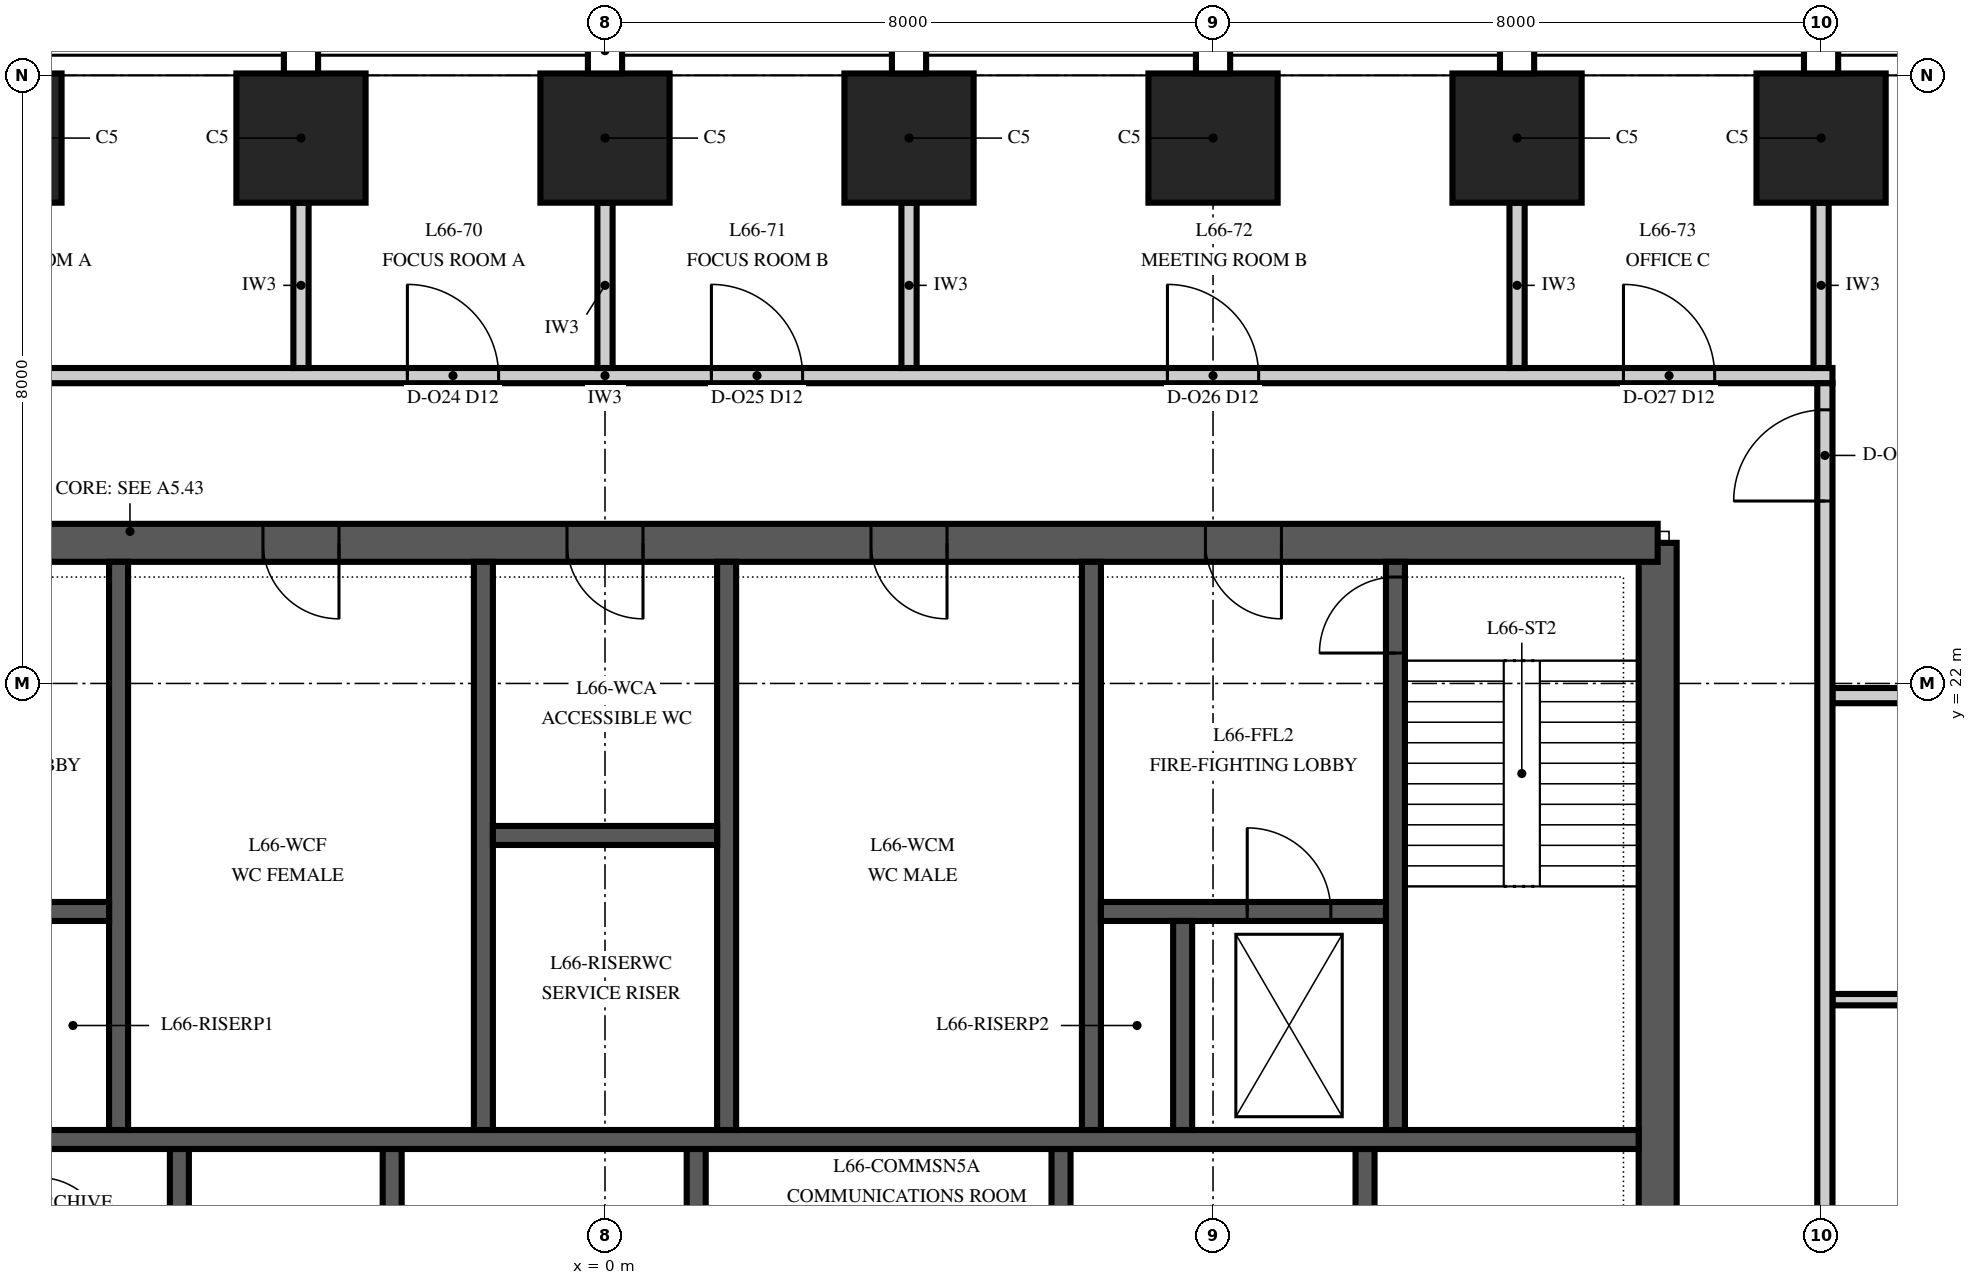
"""IFC4 building model, lengths in metres.
Left out: names, types, materials, properties, quantities, classifications, styles, units other than length and angle.
Written with IfcOpenShell. Run it as: python <this file> out.ifc"""

import sys

from ifc_helpers import new_model, si_unit, direction, frame, frame_2d, origin, origin_2d, place, context, subcontext, project, spatial, polyline, rectangle, outline, extrude, element, fill, save


model = new_model("IFC4")
c1 = context("Model", 3, precision=1e-05, world=origin(), true_north=direction((0.0, 1.0)))
c2 = subcontext(c1, "Body", "Model", "MODEL_VIEW")
j1 = project(units=[si_unit("LENGTHUNIT", "METRE"), si_unit("PLANEANGLEUNIT", "RADIAN")], contexts=[c1])
p1 = place(None, origin())
s1 = spatial("IfcSite", under=j1, at=p1, CompositionType="ELEMENT")
p2 = place(p1, origin())
s2 = spatial("IfcBuilding", under=s1, at=p2, CompositionType="ELEMENT")
p3 = place(p2, frame((0.0, 0.0, 284.0)))
s3 = spatial("IfcBuildingStorey", under=s2, at=p3, CompositionType="ELEMENT", Elevation=284.0)
for number, where, z_axis, x_axis in (
    (1, (16.0, 29.175, 0.0), (0.0, 0.0, 1.0), (-1.0, 0.0, 0.0)),
    (2, (12.0, 29.175, 0.0), (0.0, 0.0, 1.0), (-1.0, 0.0, 0.0)),
    (3, (8.0, 29.175, 0.0), (0.0, 0.0, 1.0), (-1.0, 0.0, 0.0)),
    (4, (4.0, 29.175, 0.0), (0.0, 0.0, 1.0), (-1.0, 0.0, 0.0)),
    (5, (0.0, 29.175, 0.0), (0.0, 0.0, 1.0), (-1.0, 0.0, 0.0)),
    (6, (-4.0, 29.175, 0.0), (0.0, 0.0, 1.0), (-1.0, 0.0, 0.0)),
    (7, (-8.0, 29.175, 0.0), (0.0, 0.0, 1.0), (-1.0, 0.0, 0.0)),
):
    element("IfcColumn", number, at=place(p3, frame(where, z_axis=z_axis, x_axis=x_axis)), inside=s3, PredefinedType="COLUMN", context=c2, shape_type="SweptSolid", body=[
        extrude(rectangle(XDim=1.7, YDim=1.7, at=origin_2d()), origin(), (0.0, 0.0, 1.0), 4.0),
    ])
p4 = place(p3, frame((13.85, 6.15, 0.0), z_axis=(0.0, 0.0, 1.0), x_axis=(0.0, 1.0, 0.0)))
e8 = element("IfcWall", 8, at=p4, inside=s3, PredefinedType="SHEAR", context=c2, shape_type="SweptSolid", body=[
    extrude(outline(polyline([(0.0, -0.25), (17.7, -0.25), (17.7, 0.0), (17.45, 0.0), (17.45, 0.25), (0.25, 0.25), (0.25, 0.0), (0.0, 0.0), (0.0, -0.25)])), origin(), (0.0, 0.0, 1.0), 4.0),
])
p5 = place(p4, frame((4.15, 0.0, 0.0)))
e9 = element("IfcOpeningElement", 9, at=p5, cuts=e8, PredefinedType="OPENING", context=c2, shape_type="SweptSolid", body=[
    extrude(rectangle(XDim=1.8, YDim=2.4, at=frame_2d((0.9, 1.2))), frame((0.0, 0.265, 0.0), z_axis=(0.0, -1.0, 0.0), x_axis=(1.0, 0.0, 0.0)), (0.0, 0.0, 1.0), 0.53),
])
p6 = place(p3, frame((13.85, 23.85, 0.0), z_axis=(0.0, 0.0, 1.0), x_axis=(-1.0, 0.0, 0.0)))
e10 = element("IfcWall", 10, at=p6, inside=s3, PredefinedType="SHEAR", context=c2, shape_type="SweptSolid", body=[
    extrude(rectangle(XDim=27.7, YDim=0.5, at=frame_2d((13.85, 0.0))), origin(), (0.0, 0.0, 1.0), 4.0),
])
p7 = place(p6, frame((21.75, 0.0, 0.0)))
e11 = element("IfcOpeningElement", 11, at=p7, cuts=e10, PredefinedType="OPENING", context=c2, shape_type="SweptSolid", body=[
    extrude(rectangle(XDim=1.0, YDim=2.1, at=frame_2d((0.5, 1.05))), frame((0.0, 0.265, 0.0), z_axis=(0.0, -1.0, 0.0), x_axis=(1.0, 0.0, 0.0)), (0.0, 0.0, 1.0), 0.53),
])
p8 = place(p6, frame((4.95, 0.0, 0.0)))
e12 = element("IfcOpeningElement", 12, at=p8, cuts=e10, PredefinedType="OPENING", context=c2, shape_type="SweptSolid", body=[
    extrude(rectangle(XDim=1.0, YDim=2.1, at=frame_2d((0.5, 1.05))), frame((0.0, 0.265, 0.0), z_axis=(0.0, -1.0, 0.0), x_axis=(1.0, 0.0, 0.0)), (0.0, 0.0, 1.0), 0.53),
])
p9 = place(p6, frame((17.35, 0.0, 0.0)))
e13 = element("IfcOpeningElement", 13, at=p9, cuts=e10, PredefinedType="OPENING", context=c2, shape_type="SweptSolid", body=[
    extrude(rectangle(XDim=1.0, YDim=2.1, at=frame_2d((0.5, 1.05))), frame((0.0, 0.265, 0.0), z_axis=(0.0, -1.0, 0.0), x_axis=(1.0, 0.0, 0.0)), (0.0, 0.0, 1.0), 0.53),
])
p10 = place(p6, frame((13.35, 0.0, 0.0)))
e14 = element("IfcOpeningElement", 14, at=p10, cuts=e10, PredefinedType="OPENING", context=c2, shape_type="SweptSolid", body=[
    extrude(rectangle(XDim=1.0, YDim=2.1, at=frame_2d((0.5, 1.05))), frame((0.0, 0.265, 0.0), z_axis=(0.0, -1.0, 0.0), x_axis=(1.0, 0.0, 0.0)), (0.0, 0.0, 1.0), 0.53),
])
p11 = place(p6, frame((9.35, 0.0, 0.0)))
e15 = element("IfcOpeningElement", 15, at=p11, cuts=e10, PredefinedType="OPENING", context=c2, shape_type="SweptSolid", body=[
    extrude(rectangle(XDim=1.0, YDim=2.1, at=frame_2d((0.5, 1.05))), frame((0.0, 0.265, 0.0), z_axis=(0.0, -1.0, 0.0), x_axis=(1.0, 0.0, 0.0)), (0.0, 0.0, 1.0), 0.53),
])
p12 = place(p3, frame((-13.6, 16.0, 0.0), z_axis=(0.0, 0.0, 1.0), x_axis=(1.0, 0.0, 0.0)))
e16 = element("IfcWall", 16, at=p12, inside=s3, PredefinedType="SHEAR", context=c2, shape_type="SweptSolid", body=[
    extrude(rectangle(XDim=27.2, YDim=0.25, at=frame_2d((13.6, 0.0))), origin(), (0.0, 0.0, 1.0), 4.0),
])
for number, where, z_axis, x_axis in (
    (17, (-5.6, 13.125, 0.0), (0.0, 0.0, 1.0), (0.0, 1.0, 0.0)),
    (18, (-2.8, 13.125, 0.0), (0.0, 0.0, 1.0), (0.0, 1.0, 0.0)),
    (19, (1.2, 13.125, 0.0), (0.0, 0.0, 1.0), (0.0, 1.0, 0.0)),
    (20, (6.0, 13.125, 0.0), (0.0, 0.0, 1.0), (0.0, 1.0, 0.0)),
    (21, (10.0, 13.125, 0.0), (0.0, 0.0, 1.0), (0.0, 1.0, 0.0)),
):
    element("IfcWall", number, at=place(p3, frame(where, z_axis=z_axis, x_axis=x_axis)), inside=s3, PredefinedType="SHEAR", context=c2, shape_type="SweptSolid", body=[
        extrude(rectangle(XDim=2.75, YDim=0.25, at=frame_2d((1.375, 0.0))), origin(), (0.0, 0.0, 1.0), 4.0),
    ])
for number, where, z_axis, x_axis in (
    (22, (-6.4, 16.125, 0.0), (0.0, 0.0, 1.0), (0.0, 1.0, 0.0)),
    (23, (-1.6, 16.125, 0.0), (0.0, 0.0, 1.0), (0.0, 1.0, 0.0)),
    (24, (1.6, 16.125, 0.0), (0.0, 0.0, 1.0), (0.0, 1.0, 0.0)),
    (25, (6.4, 16.125, 0.0), (0.0, 0.0, 1.0), (0.0, 1.0, 0.0)),
):
    element("IfcWall", number, at=place(p3, frame(where, z_axis=z_axis, x_axis=x_axis)), inside=s3, PredefinedType="SHEAR", context=c2, shape_type="SweptSolid", body=[
        extrude(rectangle(XDim=7.475, YDim=0.25, at=frame_2d((3.738, 0.0))), origin(), (0.0, 0.0, 1.0), 4.0),
    ])
p13 = place(p3, frame((10.4, 16.125, 0.0), z_axis=(0.0, 0.0, 1.0), x_axis=(0.0, 1.0, 0.0)))
e26 = element("IfcWall", 26, at=p13, inside=s3, PredefinedType="SHEAR", context=c2, shape_type="SweptSolid", body=[
    extrude(rectangle(XDim=7.475, YDim=0.25, at=frame_2d((3.738, 0.0))), origin(), (0.0, 0.0, 1.0), 4.0),
])
p14 = place(p13, frame((6.275, 0.0, 0.0)))
e27 = element("IfcOpeningElement", 27, at=p14, cuts=e26, PredefinedType="OPENING", context=c2, shape_type="SweptSolid", body=[
    extrude(rectangle(XDim=1.0, YDim=2.1, at=frame_2d((0.5, 1.05))), frame((0.0, 0.14, 0.0), z_axis=(0.0, -1.0, 0.0), x_axis=(1.0, 0.0, 0.0)), (0.0, 0.0, 1.0), 0.28),
])
p15 = place(p3, frame((-10.275, 19.0, 0.0), z_axis=(0.0, 0.0, 1.0), x_axis=(1.0, 0.0, 0.0)))
e28 = element("IfcWall", 28, at=p15, inside=s3, PredefinedType="SHEAR", context=c2, shape_type="SweptSolid", body=[
    extrude(rectangle(XDim=3.75, YDim=0.25, at=frame_2d((1.875, 0.0))), origin(), (0.0, 0.0, 1.0), 4.0),
])
p16 = place(p15, frame((0.725, 0.0, 0.0)))
e29 = element("IfcOpeningElement", 29, at=p16, cuts=e28, PredefinedType="OPENING", context=c2, shape_type="SweptSolid", body=[
    extrude(rectangle(XDim=1.1, YDim=2.1, at=frame_2d((0.55, 1.05))), frame((0.0, 0.14, 0.0), z_axis=(0.0, -1.0, 0.0), x_axis=(1.0, 0.0, 0.0)), (0.0, 0.0, 1.0), 0.28),
])
p17 = place(p3, frame((6.525, 19.0, 0.0), z_axis=(0.0, 0.0, 1.0), x_axis=(1.0, 0.0, 0.0)))
e30 = element("IfcWall", 30, at=p17, inside=s3, PredefinedType="SHEAR", context=c2, shape_type="SweptSolid", body=[
    extrude(rectangle(XDim=3.75, YDim=0.25, at=frame_2d((1.875, 0.0))), origin(), (0.0, 0.0, 1.0), 4.0),
])
p18 = place(p17, frame((1.925, 0.0, 0.0)))
e31 = element("IfcOpeningElement", 31, at=p18, cuts=e30, PredefinedType="OPENING", context=c2, shape_type="SweptSolid", body=[
    extrude(rectangle(XDim=1.1, YDim=2.1, at=frame_2d((0.55, 1.05))), frame((0.0, 0.14, 0.0), z_axis=(0.0, -1.0, 0.0), x_axis=(1.0, 0.0, 0.0)), (0.0, 0.0, 1.0), 0.28),
])
p19 = place(p3, frame((7.6, 16.125, 0.0), z_axis=(0.0, 0.0, 1.0), x_axis=(0.0, 1.0, 0.0)))
e32 = element("IfcWall", 32, at=p19, inside=s3, PredefinedType="SHEAR", context=c2, shape_type="SweptSolid", body=[
    extrude(rectangle(XDim=2.75, YDim=0.25, at=frame_2d((1.375, 0.0))), origin(), (0.0, 0.0, 1.0), 4.0),
])
p20 = place(p3, frame((-1.475, 20.0, 0.0), z_axis=(0.0, 0.0, 1.0), x_axis=(1.0, 0.0, 0.0)))
e33 = element("IfcWall", 33, at=p20, inside=s3, PredefinedType="SHEAR", context=c2, shape_type="SweptSolid", body=[
    extrude(rectangle(XDim=2.95, YDim=0.25, at=frame_2d((1.475, 0.0))), origin(), (0.0, 0.0, 1.0), 4.0),
])
p21 = place(p3, frame((16.15, 17.84, 0.0), z_axis=(0.0, 0.0, 1.0), x_axis=(1.0, 0.0, 0.0)))
e34 = element("IfcWall", 34, at=p21, inside=s3, PredefinedType="PARTITIONING", context=c2, shape_type="SweptSolid", body=[
    extrude(rectangle(XDim=3.575, YDim=0.15, at=frame_2d((1.788, 0.0))), origin(), (0.0, 0.0, 1.0), 3.23),
])
p22 = place(p3, frame((16.15, 21.84, 0.0), z_axis=(0.0, 0.0, 1.0), x_axis=(1.0, 0.0, 0.0)))
e35 = element("IfcWall", 35, at=p22, inside=s3, PredefinedType="PARTITIONING", context=c2, shape_type="SweptSolid", body=[
    extrude(rectangle(XDim=7.174, YDim=0.2, at=frame_2d((3.587, 0.0))), origin(), (0.0, 0.0, 1.0), 3.23),
])
p23 = place(p3, frame((-16.15, 26.05, 0.0), z_axis=(0.0, 0.0, 1.0), x_axis=(1.0, 0.0, 0.0)))
e36 = element("IfcWall", 36, at=p23, inside=s3, PredefinedType="PARTITIONING", context=c2, shape_type="SweptSolid", body=[
    extrude(rectangle(XDim=32.3, YDim=0.2, at=frame_2d((16.15, 0.0))), origin(), (0.0, 0.0, 1.0), 3.418),
])
p24 = place(p23, frame((1.55, 0.0, 0.0)))
e37 = element("IfcOpeningElement", 37, at=p24, cuts=e36, PredefinedType="OPENING", context=c2, shape_type="SweptSolid", body=[
    extrude(rectangle(XDim=1.2, YDim=2.4, at=frame_2d((0.6, 1.2))), frame((0.0, 0.115, 0.0), z_axis=(0.0, -1.0, 0.0), x_axis=(1.0, 0.0, 0.0)), (0.0, 0.0, 1.0), 0.23),
])
p25 = place(p23, frame((7.55, 0.0, 0.0)))
e38 = element("IfcOpeningElement", 38, at=p25, cuts=e36, PredefinedType="OPENING", context=c2, shape_type="SweptSolid", body=[
    extrude(rectangle(XDim=1.2, YDim=2.4, at=frame_2d((0.6, 1.2))), frame((0.0, 0.115, 0.0), z_axis=(0.0, -1.0, 0.0), x_axis=(1.0, 0.0, 0.0)), (0.0, 0.0, 1.0), 0.23),
])
p26 = place(p23, frame((13.55, 0.0, 0.0)))
e39 = element("IfcOpeningElement", 39, at=p26, cuts=e36, PredefinedType="OPENING", context=c2, shape_type="SweptSolid", body=[
    extrude(rectangle(XDim=1.2, YDim=2.4, at=frame_2d((0.6, 1.2))), frame((0.0, 0.115, 0.0), z_axis=(0.0, -1.0, 0.0), x_axis=(1.0, 0.0, 0.0)), (0.0, 0.0, 1.0), 0.23),
])
p27 = place(p23, frame((17.55, 0.0, 0.0)))
e40 = element("IfcOpeningElement", 40, at=p27, cuts=e36, PredefinedType="OPENING", context=c2, shape_type="SweptSolid", body=[
    extrude(rectangle(XDim=1.2, YDim=2.4, at=frame_2d((0.6, 1.2))), frame((0.0, 0.115, 0.0), z_axis=(0.0, -1.0, 0.0), x_axis=(1.0, 0.0, 0.0)), (0.0, 0.0, 1.0), 0.23),
])
p28 = place(p23, frame((23.55, 0.0, 0.0)))
e41 = element("IfcOpeningElement", 41, at=p28, cuts=e36, PredefinedType="OPENING", context=c2, shape_type="SweptSolid", body=[
    extrude(rectangle(XDim=1.2, YDim=2.4, at=frame_2d((0.6, 1.2))), frame((0.0, 0.115, 0.0), z_axis=(0.0, -1.0, 0.0), x_axis=(1.0, 0.0, 0.0)), (0.0, 0.0, 1.0), 0.23),
])
p29 = place(p23, frame((29.55, 0.0, 0.0)))
e42 = element("IfcOpeningElement", 42, at=p29, cuts=e36, PredefinedType="OPENING", context=c2, shape_type="SweptSolid", body=[
    extrude(rectangle(XDim=1.2, YDim=2.4, at=frame_2d((0.6, 1.2))), frame((0.0, 0.115, 0.0), z_axis=(0.0, -1.0, 0.0), x_axis=(1.0, 0.0, 0.0)), (0.0, 0.0, 1.0), 0.23),
])
for number, where, z_axis, x_axis in (
    (43, (-4.0, 26.15, 0.0), (0.0, 0.0, 1.0), (0.0, 1.0, 0.0)),
    (44, (0.0, 26.15, 0.0), (0.0, 0.0, 1.0), (0.0, 1.0, 0.0)),
    (45, (4.0, 26.15, 0.0), (0.0, 0.0, 1.0), (0.0, 1.0, 0.0)),
    (46, (12.0, 26.15, 0.0), (0.0, 0.0, 1.0), (0.0, 1.0, 0.0)),
    (47, (16.0, 26.15, 0.0), (0.0, 0.0, 1.0), (0.0, 1.0, 0.0)),
):
    element("IfcWall", number, at=place(p3, frame(where, z_axis=z_axis, x_axis=x_axis)), inside=s3, PredefinedType="PARTITIONING", context=c2, shape_type="SweptSolid", body=[
        extrude(rectangle(XDim=2.175, YDim=0.2, at=frame_2d((1.087, 0.0))), origin(), (0.0, 0.0, 1.0), 3.418),
    ])
p30 = place(p3, frame((16.05, 1.94, 0.0), z_axis=(0.0, 0.0, 1.0), x_axis=(0.0, 1.0, 0.0)))
e48 = element("IfcWall", 48, at=p30, inside=s3, PredefinedType="PARTITIONING", context=c2, shape_type="SweptSolid", body=[
    extrude(rectangle(XDim=24.01, YDim=0.2, at=frame_2d((12.005, 0.0))), origin(), (0.0, 0.0, 1.0), 2.842),
])
p31 = place(p30, frame((8.46, 0.0, 0.0)))
e49 = element("IfcOpeningElement", 49, at=p31, cuts=e48, PredefinedType="OPENING", context=c2, shape_type="SweptSolid", body=[
    extrude(rectangle(XDim=1.2, YDim=2.4, at=frame_2d((0.6, 1.2))), frame((0.0, 0.115, 0.0), z_axis=(0.0, -1.0, 0.0), x_axis=(1.0, 0.0, 0.0)), (0.0, 0.0, 1.0), 0.23),
])
p32 = place(p30, frame((22.46, 0.0, 0.0)))
e50 = element("IfcOpeningElement", 50, at=p32, cuts=e48, PredefinedType="OPENING", context=c2, shape_type="SweptSolid", body=[
    extrude(rectangle(XDim=1.2, YDim=2.4, at=frame_2d((0.6, 1.2))), frame((0.0, 0.115, 0.0), z_axis=(0.0, -1.0, 0.0), x_axis=(1.0, 0.0, 0.0)), (0.0, 0.0, 1.0), 0.23),
])
p33 = place(p8, origin())
e51 = element("IfcDoor", 51, at=p33, inside=s3, OperationType="SINGLE_SWING_RIGHT", PredefinedType="DOOR", context=c2, shape_type="SweptSolid", body=[
    extrude(rectangle(XDim=1.0, YDim=2.1, at=frame_2d((0.5, 1.05))), frame((0.0, 0.25, 0.0), z_axis=(0.0, -1.0, 0.0), x_axis=(1.0, 0.0, 0.0)), (0.0, 0.0, 1.0), 0.5),
])
fill(e12, e51)
p34 = place(p9, origin())
e52 = element("IfcDoor", 52, at=p34, inside=s3, OperationType="SINGLE_SWING_LEFT", PredefinedType="DOOR", context=c2, shape_type="SweptSolid", body=[
    extrude(rectangle(XDim=1.0, YDim=2.1, at=frame_2d((0.5, 1.05))), frame((0.0, 0.25, 0.0), z_axis=(0.0, -1.0, 0.0), x_axis=(1.0, 0.0, 0.0)), (0.0, 0.0, 1.0), 0.5),
])
fill(e13, e52)
p35 = place(p10, origin())
e53 = element("IfcDoor", 53, at=p35, inside=s3, OperationType="SINGLE_SWING_LEFT", PredefinedType="DOOR", context=c2, shape_type="SweptSolid", body=[
    extrude(rectangle(XDim=1.0, YDim=2.1, at=frame_2d((0.5, 1.05))), frame((0.0, 0.25, 0.0), z_axis=(0.0, -1.0, 0.0), x_axis=(1.0, 0.0, 0.0)), (0.0, 0.0, 1.0), 0.5),
])
fill(e14, e53)
p36 = place(p11, origin())
e54 = element("IfcDoor", 54, at=p36, inside=s3, OperationType="SINGLE_SWING_LEFT", PredefinedType="DOOR", context=c2, shape_type="SweptSolid", body=[
    extrude(rectangle(XDim=1.0, YDim=2.1, at=frame_2d((0.5, 1.05))), frame((0.0, 0.25, 0.0), z_axis=(0.0, -1.0, 0.0), x_axis=(1.0, 0.0, 0.0)), (0.0, 0.0, 1.0), 0.5),
])
fill(e15, e54)
p37 = place(p14, origin())
e55 = element("IfcDoor", 55, at=p37, inside=s3, OperationType="SINGLE_SWING_LEFT", PredefinedType="DOOR", context=c2, shape_type="SweptSolid", body=[
    extrude(rectangle(XDim=1.0, YDim=2.1, at=frame_2d((0.5, 1.05))), frame((0.0, 0.125, 0.0), z_axis=(0.0, -1.0, 0.0), x_axis=(1.0, 0.0, 0.0)), (0.0, 0.0, 1.0), 0.25),
])
fill(e27, e55)
p38 = place(p18, origin())
e56 = element("IfcDoor", 56, at=p38, inside=s3, OperationType="SLIDING_TO_RIGHT", PredefinedType="DOOR", context=c2, shape_type="SweptSolid", body=[
    extrude(rectangle(XDim=1.1, YDim=2.1, at=frame_2d((0.55, 1.05))), frame((0.0, 0.125, 0.0), z_axis=(0.0, -1.0, 0.0), x_axis=(1.0, 0.0, 0.0)), (0.0, 0.0, 1.0), 0.25),
])
fill(e31, e56)
p39 = place(p26, origin())
e57 = element("IfcDoor", 57, at=p39, inside=s3, OperationType="SINGLE_SWING_LEFT", PredefinedType="DOOR", context=c2, shape_type="SweptSolid", body=[
    extrude(rectangle(XDim=1.2, YDim=2.4, at=frame_2d((0.6, 1.2))), frame((0.0, 0.1, 0.0), z_axis=(0.0, -1.0, 0.0), x_axis=(1.0, 0.0, 0.0)), (0.0, 0.0, 1.0), 0.199),
])
fill(e39, e57)
p40 = place(p27, origin())
e58 = element("IfcDoor", 58, at=p40, inside=s3, OperationType="SINGLE_SWING_LEFT", PredefinedType="DOOR", context=c2, shape_type="SweptSolid", body=[
    extrude(rectangle(XDim=1.2, YDim=2.4, at=frame_2d((0.6, 1.2))), frame((0.0, 0.1, 0.0), z_axis=(0.0, -1.0, 0.0), x_axis=(1.0, 0.0, 0.0)), (0.0, 0.0, 1.0), 0.199),
])
fill(e40, e58)
p41 = place(p28, origin())
e59 = element("IfcDoor", 59, at=p41, inside=s3, OperationType="SINGLE_SWING_LEFT", PredefinedType="DOOR", context=c2, shape_type="SweptSolid", body=[
    extrude(rectangle(XDim=1.2, YDim=2.4, at=frame_2d((0.6, 1.2))), frame((0.0, 0.1, 0.0), z_axis=(0.0, -1.0, 0.0), x_axis=(1.0, 0.0, 0.0)), (0.0, 0.0, 1.0), 0.199),
])
fill(e41, e59)
p42 = place(p29, origin())
e60 = element("IfcDoor", 60, at=p42, inside=s3, OperationType="SINGLE_SWING_LEFT", PredefinedType="DOOR", context=c2, shape_type="SweptSolid", body=[
    extrude(rectangle(XDim=1.2, YDim=2.4, at=frame_2d((0.6, 1.2))), frame((0.0, 0.1, 0.0), z_axis=(0.0, -1.0, 0.0), x_axis=(1.0, 0.0, 0.0)), (0.0, 0.0, 1.0), 0.199),
])
fill(e42, e60)
p43 = place(p32, origin())
e61 = element("IfcDoor", 61, at=p43, inside=s3, OperationType="SINGLE_SWING_LEFT", PredefinedType="DOOR", context=c2, shape_type="SweptSolid", body=[
    extrude(rectangle(XDim=1.2, YDim=2.4, at=frame_2d((0.6, 1.2))), frame((0.0, 0.1, 0.0), z_axis=(0.0, -1.0, 0.0), x_axis=(1.0, 0.0, 0.0)), (0.0, 0.0, 1.0), 0.199),
])
fill(e50, e61)
save(model, sys.argv[1])
